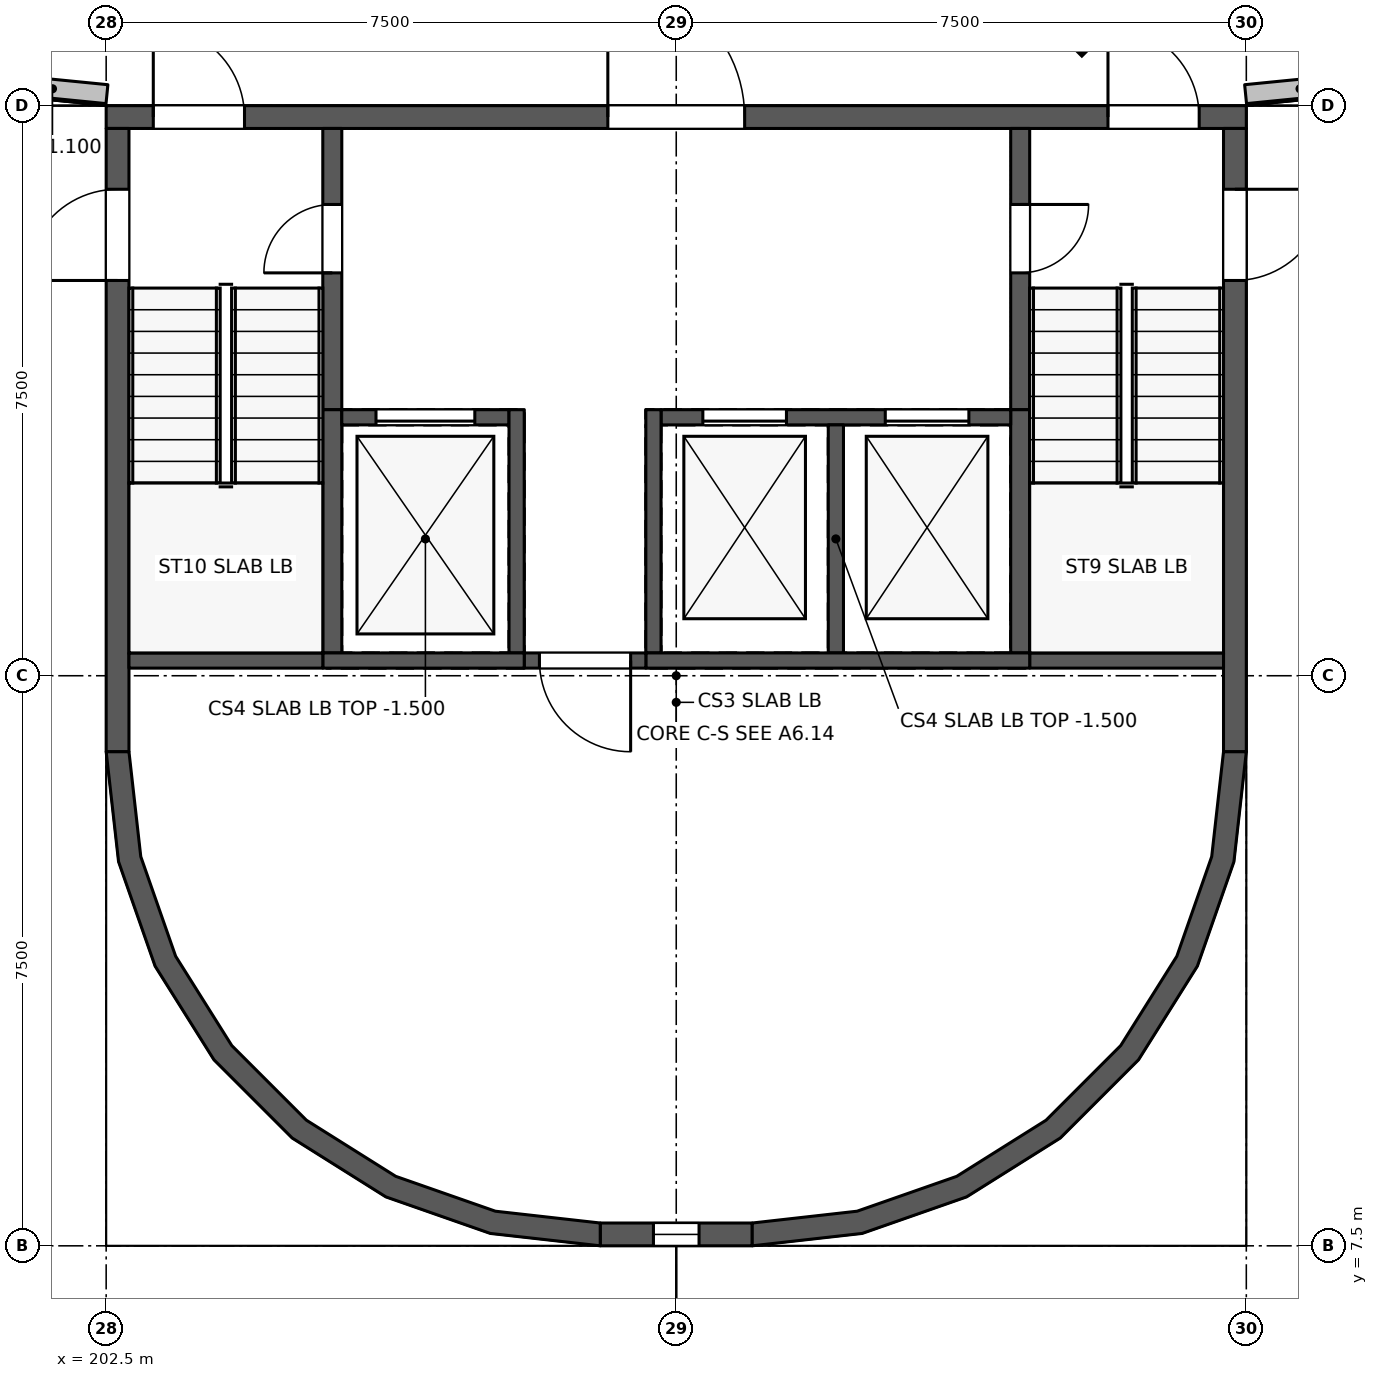
"""IFC4 building model, lengths in metres.
Left out: names, types, materials, properties, quantities, classifications, styles, units other than length and angle.
Written with IfcOpenShell. Run it as: python <this file> out.ifc"""

import sys

from ifc_helpers import new_model, si_unit, direction, frame, frame_2d, origin, place, context, subcontext, project, spatial, polyline, rectangle, outline, extrude, element, fill, save


model = new_model("IFC4")
c1 = context("Model", 3, precision=1e-05, world=origin(), true_north=direction((0.0, 1.0)))
c2 = subcontext(c1, "Body", "Model", "MODEL_VIEW")
j1 = project(units=[si_unit("LENGTHUNIT", "METRE"), si_unit("PLANEANGLEUNIT", "RADIAN")], contexts=[c1])
p1 = place(None, origin())
s1 = spatial("IfcSite", under=j1, at=p1, CompositionType="ELEMENT")
p2 = place(p1, origin())
s2 = spatial("IfcBuilding", under=s1, at=p2, CompositionType="ELEMENT")
p3 = place(p2, origin())
s3 = spatial("IfcBuildingStorey", under=s2, at=p3, CompositionType="ELEMENT", Elevation=0.0)
for number, where, z_axis, x_axis in (
    (1, (201.077, 22.793, 0.0), (0.0, 0.0, 1.0), (0.995, -0.099, 0.0)),
    (2, (217.49, 22.651, 0.0), (0.0, 0.0, 1.0), (0.995, 0.099, 0.0)),
):
    element("IfcWall", number, at=place(p3, frame(where, z_axis=z_axis, x_axis=x_axis)), inside=s3, PredefinedType="SOLIDWALL", context=c2, shape_type="SweptSolid", body=[
        extrude(rectangle(XDim=1.44, YDim=0.25, at=frame_2d((0.72, 0.0))), origin(), (0.0, 0.0, 1.0), 1.1),
    ])
p4 = place(p3, frame((202.5, 22.35, 0.0), z_axis=(0.0, 0.0, 1.0), x_axis=(1.0, 0.0, 0.0)))
e3 = element("IfcWall", 3, at=p4, inside=s3, PredefinedType="SHEAR", context=c2, shape_type="SweptSolid", body=[
    extrude(rectangle(XDim=15.0, YDim=0.3, at=frame_2d((7.5, 0.0))), origin(), (0.0, 0.0, 1.0), 3.3),
])
p5 = place(p4, frame((13.18, 0.0, 0.0)))
e4 = element("IfcOpeningElement", 4, at=p5, cuts=e3, PredefinedType="OPENING", context=c2, shape_type="SweptSolid", body=[
    extrude(rectangle(XDim=1.2, YDim=2.1, at=frame_2d((0.6, 1.05))), frame((0.0, 0.16, 0.0), z_axis=(0.0, -1.0, 0.0), x_axis=(1.0, 0.0, 0.0)), (0.0, 0.0, 1.0), 0.32),
])
p6 = place(p4, frame((0.62, 0.0, 0.0)))
e5 = element("IfcOpeningElement", 5, at=p6, cuts=e3, PredefinedType="OPENING", context=c2, shape_type="SweptSolid", body=[
    extrude(rectangle(XDim=1.2, YDim=2.1, at=frame_2d((0.6, 1.05))), frame((0.0, 0.16, 0.0), z_axis=(0.0, -1.0, 0.0), x_axis=(1.0, 0.0, 0.0)), (0.0, 0.0, 1.0), 0.32),
])
p7 = place(p4, frame((6.6, 0.0, 0.0)))
e6 = element("IfcOpeningElement", 6, at=p7, cuts=e3, PredefinedType="OPENING", context=c2, shape_type="SweptSolid", body=[
    extrude(rectangle(XDim=1.8, YDim=2.1, at=frame_2d((0.9, 1.05))), frame((0.0, 0.16, 0.0), z_axis=(0.0, -1.0, 0.0), x_axis=(1.0, 0.0, 0.0)), (0.0, 0.0, 1.0), 0.32),
])
p8 = place(p3, frame((211.0, 7.65, 0.0), z_axis=(0.0, 0.0, 1.0), x_axis=(-1.0, 0.0, 0.0)))
e7 = element("IfcWall", 7, at=p8, inside=s3, PredefinedType="SHEAR", context=c2, shape_type="SweptSolid", body=[
    extrude(rectangle(XDim=2.0, YDim=0.3, at=frame_2d((1.0, 0.0))), origin(), (0.0, 0.0, 1.0), 3.3),
])
p9 = place(p8, frame((0.7, 0.0, 0.3)))
e8 = element("IfcOpeningElement", 8, at=p9, cuts=e7, PredefinedType="OPENING", context=c2, shape_type="SweptSolid", body=[
    extrude(rectangle(XDim=0.6, YDim=2.7, at=frame_2d((0.3, 1.35))), frame((0.0, 0.16, 0.0), z_axis=(0.0, -1.0, 0.0), x_axis=(1.0, 0.0, 0.0)), (0.0, 0.0, 1.0), 0.32),
])
p10 = place(p3, frame((217.35, 22.2, 0.0), z_axis=(0.0, 0.0, 1.0), x_axis=(0.0, -1.0, 0.0)))
e9 = element("IfcWall", 9, at=p10, inside=s3, PredefinedType="SHEAR", context=c2, shape_type="SweptSolid", body=[
    extrude(rectangle(XDim=8.2, YDim=0.3, at=frame_2d((4.1, 0.0))), origin(), (0.0, 0.0, 1.0), 3.3),
])
p11 = place(p10, frame((0.8, 0.0, 0.0)))
e10 = element("IfcOpeningElement", 10, at=p11, cuts=e9, PredefinedType="OPENING", context=c2, shape_type="SweptSolid", body=[
    extrude(rectangle(XDim=1.2, YDim=2.1, at=frame_2d((0.6, 1.05))), frame((0.0, 0.16, 0.0), z_axis=(0.0, -1.0, 0.0), x_axis=(1.0, 0.0, 0.0)), (0.0, 0.0, 1.0), 0.32),
])
p12 = place(p3, frame((202.65, 14.0, 0.0), z_axis=(0.0, 0.0, 1.0), x_axis=(0.0, 1.0, 0.0)))
e11 = element("IfcWall", 11, at=p12, inside=s3, PredefinedType="SHEAR", context=c2, shape_type="SweptSolid", body=[
    extrude(rectangle(XDim=8.2, YDim=0.3, at=frame_2d((4.1, 0.0))), origin(), (0.0, 0.0, 1.0), 3.3),
])
p13 = place(p12, frame((6.2, 0.0, 0.0)))
e12 = element("IfcOpeningElement", 12, at=p13, cuts=e11, PredefinedType="OPENING", context=c2, shape_type="SweptSolid", body=[
    extrude(rectangle(XDim=1.2, YDim=2.1, at=frame_2d((0.6, 1.05))), frame((0.0, 0.16, 0.0), z_axis=(0.0, -1.0, 0.0), x_axis=(1.0, 0.0, 0.0)), (0.0, 0.0, 1.0), 0.32),
])
p14 = place(p3, frame((214.525, 22.2, 0.0), z_axis=(0.0, 0.0, 1.0), x_axis=(0.0, -1.0, 0.0)))
e13 = element("IfcWall", 13, at=p14, inside=s3, PredefinedType="STANDARD", context=c2, shape_type="SweptSolid", body=[
    extrude(rectangle(XDim=3.7, YDim=0.25, at=frame_2d((1.85, 0.0))), origin(), (0.0, 0.0, 1.0), 3.1),
])
p15 = place(p14, frame((1.0, 0.0, 0.0)))
e14 = element("IfcOpeningElement", 14, at=p15, cuts=e13, PredefinedType="OPENING", context=c2, shape_type="SweptSolid", body=[
    extrude(rectangle(XDim=0.9, YDim=2.1, at=frame_2d((0.45, 1.05))), frame((0.0, 0.135, 0.0), z_axis=(0.0, -1.0, 0.0), x_axis=(1.0, 0.0, 0.0)), (0.0, 0.0, 1.0), 0.27),
])
p16 = place(p3, frame((214.525, 18.5, 0.0), z_axis=(0.0, 0.0, 1.0), x_axis=(0.0, -1.0, 0.0)))
e15 = element("IfcWall", 15, at=p16, inside=s3, PredefinedType="STANDARD", context=c2, shape_type="SweptSolid", body=[
    extrude(rectangle(XDim=3.2, YDim=0.25, at=frame_2d((1.6, 0.0))), origin(), (0.0, 0.0, 1.0), 3.1),
])
p17 = place(p3, frame((205.475, 18.5, 0.0), z_axis=(0.0, 0.0, 1.0), x_axis=(0.0, 1.0, 0.0)))
e16 = element("IfcWall", 16, at=p17, inside=s3, PredefinedType="STANDARD", context=c2, shape_type="SweptSolid", body=[
    extrude(rectangle(XDim=3.7, YDim=0.25, at=frame_2d((1.85, 0.0))), origin(), (0.0, 0.0, 1.0), 3.1),
])
p18 = place(p17, frame((1.8, 0.0, 0.0)))
e17 = element("IfcOpeningElement", 17, at=p18, cuts=e16, PredefinedType="OPENING", context=c2, shape_type="SweptSolid", body=[
    extrude(rectangle(XDim=0.9, YDim=2.1, at=frame_2d((0.45, 1.05))), frame((0.0, 0.135, 0.0), z_axis=(0.0, -1.0, 0.0), x_axis=(1.0, 0.0, 0.0)), (0.0, 0.0, 1.0), 0.27),
])
p19 = place(p3, frame((205.475, 18.5, 0.0), z_axis=(0.0, 0.0, 1.0), x_axis=(0.0, -1.0, 0.0)))
e18 = element("IfcWall", 18, at=p19, inside=s3, PredefinedType="STANDARD", context=c2, shape_type="SweptSolid", body=[
    extrude(rectangle(XDim=3.2, YDim=0.25, at=frame_2d((1.6, 0.0))), origin(), (0.0, 0.0, 1.0), 3.1),
])
p20 = place(p3, frame((214.4, 18.4, 0.0), z_axis=(0.0, 0.0, 1.0), x_axis=(-1.0, 0.0, 0.0)))
e19 = element("IfcWall", 19, at=p20, inside=s3, PredefinedType="STANDARD", context=c2, shape_type="SweptSolid", body=[
    extrude(rectangle(XDim=4.6, YDim=0.2, at=frame_2d((2.3, 0.0))), origin(), (0.0, 0.0, 1.0), 3.1),
])
p21 = place(p20, frame((0.55, 0.0, 0.0)))
e20 = element("IfcOpeningElement", 20, at=p21, cuts=e19, PredefinedType="OPENING", context=c2, shape_type="SweptSolid", body=[
    extrude(rectangle(XDim=1.1, YDim=2.1, at=frame_2d((0.55, 1.05))), frame((0.0, 0.11, 0.0), z_axis=(0.0, -1.0, 0.0), x_axis=(1.0, 0.0, 0.0)), (0.0, 0.0, 1.0), 0.22),
])
p22 = place(p20, frame((2.95, 0.0, 0.0)))
e21 = element("IfcOpeningElement", 21, at=p22, cuts=e19, PredefinedType="OPENING", context=c2, shape_type="SweptSolid", body=[
    extrude(rectangle(XDim=1.1, YDim=2.1, at=frame_2d((0.55, 1.05))), frame((0.0, 0.11, 0.0), z_axis=(0.0, -1.0, 0.0), x_axis=(1.0, 0.0, 0.0)), (0.0, 0.0, 1.0), 0.22),
])
p23 = place(p3, frame((207.8, 18.4, 0.0), z_axis=(0.0, 0.0, 1.0), x_axis=(-1.0, 0.0, 0.0)))
e22 = element("IfcWall", 22, at=p23, inside=s3, PredefinedType="STANDARD", context=c2, shape_type="SweptSolid", body=[
    extrude(rectangle(XDim=2.2, YDim=0.2, at=frame_2d((1.1, 0.0))), origin(), (0.0, 0.0, 1.0), 3.1),
])
p24 = place(p23, frame((0.45, 0.0, 0.0)))
e23 = element("IfcOpeningElement", 23, at=p24, cuts=e22, PredefinedType="OPENING", context=c2, shape_type="SweptSolid", body=[
    extrude(rectangle(XDim=1.3, YDim=2.1, at=frame_2d((0.65, 1.05))), frame((0.0, 0.11, 0.0), z_axis=(0.0, -1.0, 0.0), x_axis=(1.0, 0.0, 0.0)), (0.0, 0.0, 1.0), 0.22),
])
p25 = place(p3, frame((212.1, 18.3, 0.0), z_axis=(0.0, 0.0, 1.0), x_axis=(0.0, -1.0, 0.0)))
e24 = element("IfcWall", 24, at=p25, inside=s3, PredefinedType="STANDARD", context=c2, shape_type="SweptSolid", body=[
    extrude(rectangle(XDim=3.0, YDim=0.2, at=frame_2d((1.5, 0.0))), origin(), (0.0, 0.0, 1.0), 3.1),
])
for number, where, z_axis, x_axis in (
    (25, (209.7, 18.5, 0.0), (0.0, 0.0, 1.0), (0.0, -1.0, 0.0)),
    (26, (207.9, 18.5, 0.0), (0.0, 0.0, 1.0), (0.0, -1.0, 0.0)),
):
    element("IfcWall", number, at=place(p3, frame(where, z_axis=z_axis, x_axis=x_axis)), inside=s3, PredefinedType="STANDARD", context=c2, shape_type="SweptSolid", body=[
        extrude(rectangle(XDim=3.2, YDim=0.2, at=frame_2d((1.6, 0.0))), origin(), (0.0, 0.0, 1.0), 3.1),
    ])
p26 = place(p3, frame((217.2, 15.2, 0.0), z_axis=(0.0, 0.0, 1.0), x_axis=(-1.0, 0.0, 0.0)))
e27 = element("IfcWall", 27, at=p26, inside=s3, PredefinedType="STANDARD", context=c2, shape_type="SweptSolid", body=[
    extrude(rectangle(XDim=2.55, YDim=0.2, at=frame_2d((1.275, 0.0))), origin(), (0.0, 0.0, 1.0), 3.1),
])
p27 = place(p3, frame((214.65, 15.2, 0.0), z_axis=(0.0, 0.0, 1.0), x_axis=(-1.0, 0.0, 0.0)))
e28 = element("IfcWall", 28, at=p27, inside=s3, PredefinedType="STANDARD", context=c2, shape_type="SweptSolid", body=[
    extrude(rectangle(XDim=5.05, YDim=0.2, at=frame_2d((2.525, 0.0))), origin(), (0.0, 0.0, 1.0), 3.1),
])
p28 = place(p3, frame((209.6, 15.2, 0.0), z_axis=(0.0, 0.0, 1.0), x_axis=(-1.0, 0.0, 0.0)))
e29 = element("IfcWall", 29, at=p28, inside=s3, PredefinedType="STANDARD", context=c2, shape_type="SweptSolid", body=[
    extrude(rectangle(XDim=1.6, YDim=0.2, at=frame_2d((0.8, 0.0))), origin(), (0.0, 0.0, 1.0), 3.1),
])
p29 = place(p28, frame((0.2, 0.0, 0.0)))
e30 = element("IfcOpeningElement", 30, at=p29, cuts=e29, PredefinedType="OPENING", context=c2, shape_type="SweptSolid", body=[
    extrude(rectangle(XDim=1.2, YDim=2.1, at=frame_2d((0.6, 1.05))), frame((0.0, 0.11, 0.0), z_axis=(0.0, -1.0, 0.0), x_axis=(1.0, 0.0, 0.0)), (0.0, 0.0, 1.0), 0.22),
])
p30 = place(p3, frame((208.0, 15.2, 0.0), z_axis=(0.0, 0.0, 1.0), x_axis=(-1.0, 0.0, 0.0)))
e31 = element("IfcWall", 31, at=p30, inside=s3, PredefinedType="STANDARD", context=c2, shape_type="SweptSolid", body=[
    extrude(rectangle(XDim=2.65, YDim=0.2, at=frame_2d((1.325, 0.0))), origin(), (0.0, 0.0, 1.0), 3.1),
])
p31 = place(p3, frame((205.35, 15.2, 0.0), z_axis=(0.0, 0.0, 1.0), x_axis=(-1.0, 0.0, 0.0)))
e32 = element("IfcWall", 32, at=p31, inside=s3, PredefinedType="STANDARD", context=c2, shape_type="SweptSolid", body=[
    extrude(rectangle(XDim=2.55, YDim=0.2, at=frame_2d((1.275, 0.0))), origin(), (0.0, 0.0, 1.0), 3.1),
])
p32 = place(p3, origin())
e33 = element("IfcWall", 33, at=p32, inside=s3, PredefinedType="SHEAR", context=c2, shape_type="SweptSolid", body=[
    extrude(outline(polyline([(217.5, 14.0), (217.337, 12.554), (216.856, 11.18), (216.082, 9.947), (215.053, 8.918), (213.82, 8.144), (212.446, 7.663), (211.0, 7.5), (211.0, 7.8), (212.38, 7.955), (213.69, 8.414), (214.865, 9.153), (215.847, 10.135), (216.586, 11.31), (217.045, 12.62), (217.2, 14.0), (217.5, 14.0)])), origin(), (0.0, 0.0, 1.0), 3.3),
])
p33 = place(p3, origin())
e34 = element("IfcWall", 34, at=p33, inside=s3, PredefinedType="SHEAR", context=c2, shape_type="SweptSolid", body=[
    extrude(outline(polyline([(202.5, 14.0), (202.663, 12.554), (203.144, 11.18), (203.918, 9.947), (204.947, 8.918), (206.18, 8.144), (207.554, 7.663), (209.0, 7.5), (209.0, 7.8), (207.62, 7.955), (206.31, 8.414), (205.135, 9.153), (204.153, 10.135), (203.414, 11.31), (202.955, 12.62), (202.8, 14.0), (202.5, 14.0)])), origin(), (0.0, 0.0, 1.0), 3.3),
])
p34 = place(p3, frame((214.6, 18.4, -1.5), z_axis=(0.0, 0.0, 1.0), x_axis=(-1.0, 0.0, 0.0)))
e35 = element("IfcWall", 35, at=p34, inside=s3, PredefinedType="STANDARD", context=c2, shape_type="SweptSolid", body=[
    extrude(rectangle(XDim=5.0, YDim=0.2, at=frame_2d((2.5, 0.0))), origin(), (0.0, 0.0, 1.0), 1.3),
])
for number, where, z_axis, x_axis in (
    (36, (214.5, 18.3, -1.5), (0.0, 0.0, 1.0), (0.0, -1.0, 0.0)),
    (37, (212.1, 18.3, -1.5), (0.0, 0.0, 1.0), (0.0, -1.0, 0.0)),
    (38, (209.7, 18.3, -1.5), (0.0, 0.0, 1.0), (0.0, -1.0, 0.0)),
):
    element("IfcWall", number, at=place(p3, frame(where, z_axis=z_axis, x_axis=x_axis)), inside=s3, PredefinedType="STANDARD", context=c2, shape_type="SweptSolid", body=[
        extrude(rectangle(XDim=3.0, YDim=0.2, at=frame_2d((1.5, 0.0))), origin(), (0.0, 0.0, 1.0), 1.3),
    ])
p35 = place(p3, frame((214.6, 15.2, -1.5), z_axis=(0.0, 0.0, 1.0), x_axis=(-1.0, 0.0, 0.0)))
e39 = element("IfcWall", 39, at=p35, inside=s3, PredefinedType="STANDARD", context=c2, shape_type="SweptSolid", body=[
    extrude(rectangle(XDim=5.0, YDim=0.2, at=frame_2d((2.5, 0.0))), origin(), (0.0, 0.0, 1.0), 1.3),
])
p36 = place(p3, frame((208.0, 18.4, -1.5), z_axis=(0.0, 0.0, 1.0), x_axis=(-1.0, 0.0, 0.0)))
e40 = element("IfcWall", 40, at=p36, inside=s3, PredefinedType="STANDARD", context=c2, shape_type="SweptSolid", body=[
    extrude(rectangle(XDim=2.6, YDim=0.2, at=frame_2d((1.3, 0.0))), origin(), (0.0, 0.0, 1.0), 1.3),
])
for number, where, z_axis, x_axis in (
    (41, (207.9, 18.3, -1.5), (0.0, 0.0, 1.0), (0.0, -1.0, 0.0)),
    (42, (205.5, 18.3, -1.5), (0.0, 0.0, 1.0), (0.0, -1.0, 0.0)),
):
    element("IfcWall", number, at=place(p3, frame(where, z_axis=z_axis, x_axis=x_axis)), inside=s3, PredefinedType="STANDARD", context=c2, shape_type="SweptSolid", body=[
        extrude(rectangle(XDim=3.0, YDim=0.2, at=frame_2d((1.5, 0.0))), origin(), (0.0, 0.0, 1.0), 1.3),
    ])
p37 = place(p3, frame((208.0, 15.2, -1.5), z_axis=(0.0, 0.0, 1.0), x_axis=(-1.0, 0.0, 0.0)))
e43 = element("IfcWall", 43, at=p37, inside=s3, PredefinedType="STANDARD", context=c2, shape_type="SweptSolid", body=[
    extrude(rectangle(XDim=2.6, YDim=0.2, at=frame_2d((1.3, 0.0))), origin(), (0.0, 0.0, 1.0), 1.3),
])
p38 = place(p5, origin())
e44 = element("IfcDoor", 44, at=p38, inside=s3, OperationType="SINGLE_SWING_RIGHT", PredefinedType="DOOR", context=c2, shape_type="SweptSolid", body=[
    extrude(rectangle(XDim=1.2, YDim=2.1, at=frame_2d((0.6, 1.05))), frame((0.0, 0.025, 0.0), z_axis=(0.0, -1.0, 0.0), x_axis=(1.0, 0.0, 0.0)), (0.0, 0.0, 1.0), 0.05),
])
fill(e4, e44)
p39 = place(p6, origin())
e45 = element("IfcDoor", 45, at=p39, inside=s3, OperationType="SINGLE_SWING_LEFT", PredefinedType="DOOR", context=c2, shape_type="SweptSolid", body=[
    extrude(rectangle(XDim=1.2, YDim=2.1, at=frame_2d((0.6, 1.05))), frame((0.0, 0.025, 0.0), z_axis=(0.0, -1.0, 0.0), x_axis=(1.0, 0.0, 0.0)), (0.0, 0.0, 1.0), 0.05),
])
fill(e5, e45)
p40 = place(p7, origin())
e46 = element("IfcDoor", 46, at=p40, inside=s3, OperationType="DOUBLE_DOOR_SINGLE_SWING", PredefinedType="DOOR", context=c2, shape_type="SweptSolid", body=[
    extrude(rectangle(XDim=1.8, YDim=2.1, at=frame_2d((0.9, 1.05))), frame((0.0, 0.025, 0.0), z_axis=(0.0, -1.0, 0.0), x_axis=(1.0, 0.0, 0.0)), (0.0, 0.0, 1.0), 0.05),
])
fill(e6, e46)
p41 = place(p15, origin())
e47 = element("IfcDoor", 47, at=p41, inside=s3, OperationType="SINGLE_SWING_LEFT", PredefinedType="DOOR", context=c2, shape_type="SweptSolid", body=[
    extrude(rectangle(XDim=0.9, YDim=2.1, at=frame_2d((0.45, 1.05))), frame((0.0, 0.025, 0.0), z_axis=(0.0, -1.0, 0.0), x_axis=(1.0, 0.0, 0.0)), (0.0, 0.0, 1.0), 0.05),
])
fill(e14, e47)
p42 = place(p18, origin())
e48 = element("IfcDoor", 48, at=p42, inside=s3, OperationType="SINGLE_SWING_RIGHT", PredefinedType="DOOR", context=c2, shape_type="SweptSolid", body=[
    extrude(rectangle(XDim=0.9, YDim=2.1, at=frame_2d((0.45, 1.05))), frame((0.0, 0.025, 0.0), z_axis=(0.0, -1.0, 0.0), x_axis=(1.0, 0.0, 0.0)), (0.0, 0.0, 1.0), 0.05),
])
fill(e17, e48)
p43 = place(p21, origin())
e49 = element("IfcDoor", 49, at=p43, inside=s3, OperationType="DOUBLE_DOOR_SLIDING", PredefinedType="DOOR", context=c2, shape_type="SweptSolid", body=[
    extrude(rectangle(XDim=1.1, YDim=2.1, at=frame_2d((0.55, 1.05))), frame((0.0, 0.025, 0.0), z_axis=(0.0, -1.0, 0.0), x_axis=(1.0, 0.0, 0.0)), (0.0, 0.0, 1.0), 0.05),
])
fill(e20, e49)
p44 = place(p22, origin())
e50 = element("IfcDoor", 50, at=p44, inside=s3, OperationType="DOUBLE_DOOR_SLIDING", PredefinedType="DOOR", context=c2, shape_type="SweptSolid", body=[
    extrude(rectangle(XDim=1.1, YDim=2.1, at=frame_2d((0.55, 1.05))), frame((0.0, 0.025, 0.0), z_axis=(0.0, -1.0, 0.0), x_axis=(1.0, 0.0, 0.0)), (0.0, 0.0, 1.0), 0.05),
])
fill(e21, e50)
p45 = place(p24, origin())
e51 = element("IfcDoor", 51, at=p45, inside=s3, OperationType="DOUBLE_DOOR_SLIDING", PredefinedType="DOOR", context=c2, shape_type="SweptSolid", body=[
    extrude(rectangle(XDim=1.3, YDim=2.1, at=frame_2d((0.65, 1.05))), frame((0.0, 0.025, 0.0), z_axis=(0.0, -1.0, 0.0), x_axis=(1.0, 0.0, 0.0)), (0.0, 0.0, 1.0), 0.05),
])
fill(e23, e51)
p46 = place(p29, origin())
e52 = element("IfcDoor", 52, at=p46, inside=s3, OperationType="SINGLE_SWING_RIGHT", PredefinedType="DOOR", context=c2, shape_type="SweptSolid", body=[
    extrude(rectangle(XDim=1.2, YDim=2.1, at=frame_2d((0.6, 1.05))), frame((0.0, 0.025, 0.0), z_axis=(0.0, -1.0, 0.0), x_axis=(1.0, 0.0, 0.0)), (0.0, 0.0, 1.0), 0.05),
])
fill(e30, e52)
p47 = place(p11, origin())
e53 = element("IfcDoor", 53, at=p47, inside=s3, OperationType="SINGLE_SWING_RIGHT", PredefinedType="DOOR", context=c2, shape_type="SweptSolid", body=[
    extrude(rectangle(XDim=1.2, YDim=2.1, at=frame_2d((0.6, 1.05))), frame((0.0, 0.025, 0.0), z_axis=(0.0, -1.0, 0.0), x_axis=(1.0, 0.0, 0.0)), (0.0, 0.0, 1.0), 0.05),
])
fill(e10, e53)
p48 = place(p13, origin())
e54 = element("IfcDoor", 54, at=p48, inside=s3, OperationType="SINGLE_SWING_RIGHT", PredefinedType="DOOR", context=c2, shape_type="SweptSolid", body=[
    extrude(rectangle(XDim=1.2, YDim=2.1, at=frame_2d((0.6, 1.05))), frame((0.0, 0.025, 0.0), z_axis=(0.0, -1.0, 0.0), x_axis=(1.0, 0.0, 0.0)), (0.0, 0.0, 1.0), 0.05),
])
fill(e12, e54)
p49 = place(p9, origin())
e55 = element("IfcWindow", 55, at=p49, inside=s3, PartitioningType="SINGLE_PANEL", PredefinedType="WINDOW", context=c2, shape_type="SweptSolid", body=[
    extrude(rectangle(XDim=0.6, YDim=2.7, at=frame_2d((0.3, 1.35))), frame((0.0, 0.03, 0.0), z_axis=(0.0, -1.0, 0.0), x_axis=(1.0, 0.0, 0.0)), (0.0, 0.0, 1.0), 0.06),
])
fill(e8, e55)
save(model, sys.argv[1])
